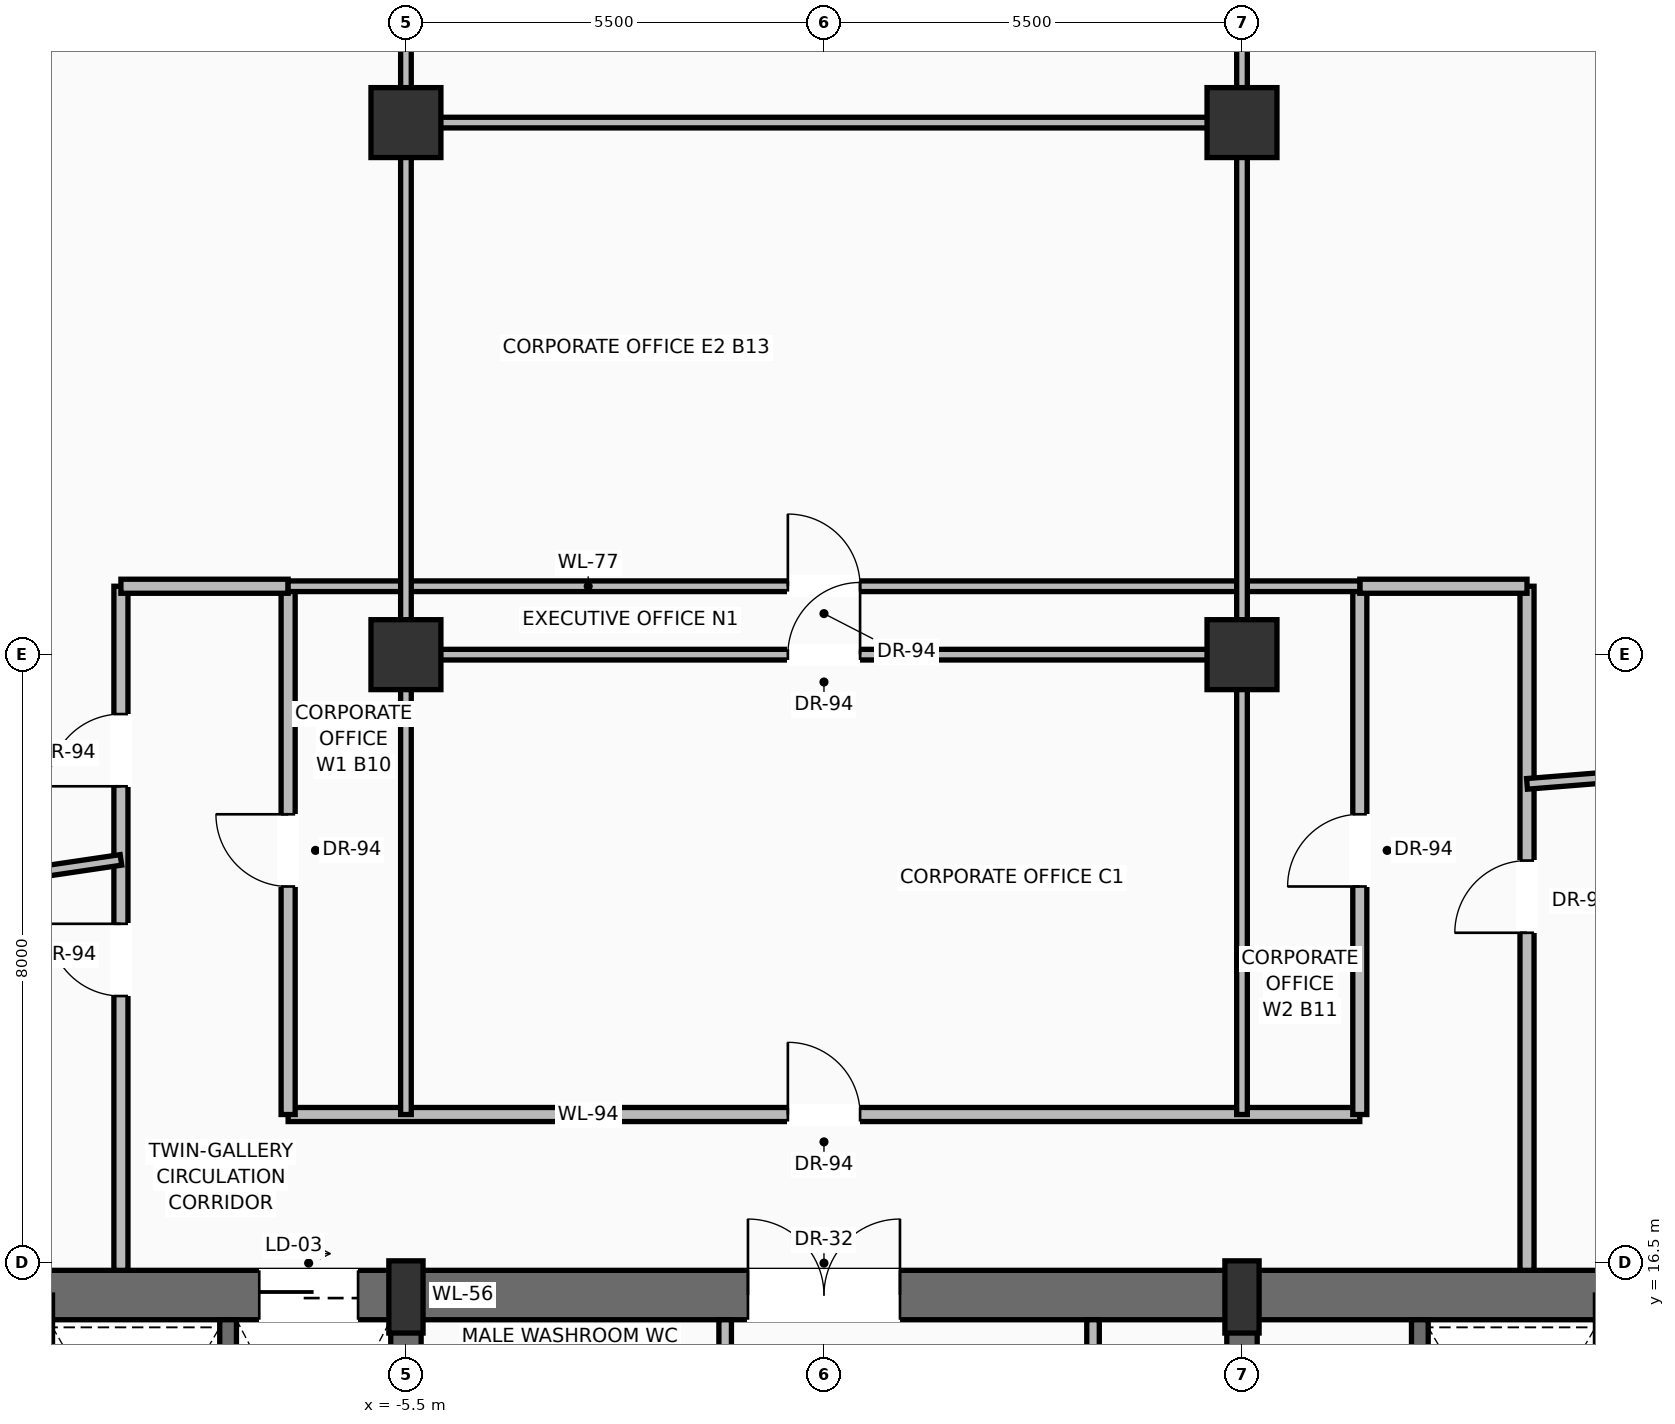
"""IFC4 building model, lengths in metres.
Left out: names, types, materials, properties, quantities, classifications, styles, units other than length and angle.
Written with IfcOpenShell. Run it as: python <this file> out.ifc"""

import sys

from ifc_helpers import new_model, si_unit, direction, frame, frame_2d, origin, origin_2d, place, context, subcontext, project, spatial, rectangle, extrude, source, transform, mapped, element, fill, save


model = new_model("IFC4")
c1 = context("Model", 3, precision=1e-05, world=origin(), true_north=direction((0.0, 1.0)))
c2 = subcontext(c1, "Body", "Model", "MODEL_VIEW")
j1 = project(units=[si_unit("LENGTHUNIT", "METRE"), si_unit("PLANEANGLEUNIT", "RADIAN")], contexts=[c1])
p1 = place(None, origin())
s1 = spatial("IfcSite", under=j1, at=p1, CompositionType="ELEMENT")
p2 = place(p1, origin())
s2 = spatial("IfcBuilding", under=s1, at=p2, CompositionType="ELEMENT")
p3 = place(p2, frame((0.0, 0.0, 125.6)))
s3 = spatial("IfcBuildingStorey", under=s2, at=p3, CompositionType="ELEMENT", Elevation=125.6)
p4 = place(p3, frame((-10.8, 16.075, 0.0), z_axis=(0.0, 0.0, 1.0), x_axis=(1.0, 0.0, 0.0)))
e1 = element("IfcWall", 1, at=p4, inside=s3, PredefinedType="SHEAR", context=c2, shape_type="SweptSolid", body=[
    extrude(rectangle(XDim=21.6, YDim=0.65, at=frame_2d((10.8, 0.0))), origin(), (0.0, 0.0, 1.0), 3.47),
])
p5 = place(p4, frame((3.37, 0.0, 0.0)))
e2 = element("IfcOpeningElement", 2, at=p5, cuts=e1, PredefinedType="OPENING", context=c2, shape_type="SweptSolid", body=[
    extrude(rectangle(XDim=1.3, YDim=2.3, at=frame_2d((0.65, 1.15))), frame((0.0, 0.335, 0.0), z_axis=(0.0, -1.0, 0.0), x_axis=(1.0, 0.0, 0.0)), (0.0, 0.0, 1.0), 0.67),
])
p6 = place(p4, frame((9.8, 0.0, 0.0)))
e3 = element("IfcOpeningElement", 3, at=p6, cuts=e1, PredefinedType="OPENING", context=c2, shape_type="SweptSolid", body=[
    extrude(rectangle(XDim=2.0, YDim=2.4, at=frame_2d((1.0, 1.2))), frame((0.0, 0.335, 0.0), z_axis=(0.0, -1.0, 0.0), x_axis=(1.0, 0.0, 0.0)), (0.0, 0.0, 1.0), 0.67),
])
for number, where, z_axis, x_axis in (
    (4, (-10.475, 0.525, 0.0), (0.0, 0.0, 1.0), (0.0, 1.0, 0.0)),
    (5, (10.475, 0.525, 0.0), (0.0, 0.0, 1.0), (0.0, 1.0, 0.0)),
):
    element("IfcWall", number, at=place(p3, frame(where, z_axis=z_axis, x_axis=x_axis)), inside=s3, PredefinedType="SHEAR", context=c2, shape_type="SweptSolid", body=[
        extrude(rectangle(XDim=15.55, YDim=0.65, at=frame_2d((7.775, 0.0))), origin(), (0.0, 0.0, 1.0), 3.47),
    ])
p7 = place(p3, frame((-5.5, 0.525, 0.0), z_axis=(0.0, 0.0, 1.0), x_axis=(0.0, 1.0, 0.0)))
e6 = element("IfcWall", 6, at=p7, inside=s3, PredefinedType="SHEAR", context=c2, shape_type="SweptSolid", body=[
    extrude(rectangle(XDim=15.55, YDim=0.4, at=frame_2d((7.775, 0.0))), origin(), (0.0, 0.0, 1.0), 3.47),
])
p8 = place(p7, frame((8.975, 0.0, 0.0)))
e7 = element("IfcOpeningElement", 7, at=p8, cuts=e6, PredefinedType="OPENING", context=c2, shape_type="SweptSolid", body=[
    extrude(rectangle(XDim=1.1, YDim=2.2, at=frame_2d((0.55, 1.1))), frame((0.0, 0.21, 0.0), z_axis=(0.0, -1.0, 0.0), x_axis=(1.0, 0.0, 0.0)), (0.0, 0.0, 1.0), 0.42),
])
p9 = place(p3, frame((5.5, 0.525, 0.0), z_axis=(0.0, 0.0, 1.0), x_axis=(0.0, 1.0, 0.0)))
e8 = element("IfcWall", 8, at=p9, inside=s3, PredefinedType="SHEAR", context=c2, shape_type="SweptSolid", body=[
    extrude(rectangle(XDim=15.55, YDim=0.4, at=frame_2d((7.775, 0.0))), origin(), (0.0, 0.0, 1.0), 3.47),
])
p10 = place(p9, frame((8.975, 0.0, 0.0)))
e9 = element("IfcOpeningElement", 9, at=p10, cuts=e8, PredefinedType="OPENING", context=c2, shape_type="SweptSolid", body=[
    extrude(rectangle(XDim=1.1, YDim=2.2, at=frame_2d((0.55, 1.1))), frame((0.0, 0.21, 0.0), z_axis=(0.0, -1.0, 0.0), x_axis=(1.0, 0.0, 0.0)), (0.0, 0.0, 1.0), 0.42),
])
m1 = source(origin(), c2, "Body", "SweptSolid", [
    extrude(rectangle(XDim=0.45, YDim=0.95, at=origin_2d()), origin(), (0.0, 0.0, 1.0), 3.7),
])
for number, where, z_axis, x_axis in (
    (10, (-5.5, 16.05, 0.0), (0.0, 0.0, 1.0), (1.0, 0.0, 0.0)),
    (11, (5.5, 16.05, 0.0), (0.0, 0.0, 1.0), (1.0, 0.0, 0.0)),
):
    element("IfcColumn", number, at=place(p3, frame(where, z_axis=z_axis, x_axis=x_axis)), inside=s3, PredefinedType="PILASTER", context=c2, shape_type="MappedRepresentation", body=[
        mapped(m1, transform((0.0, 0.0, 0.0), scale=1.0)),
    ])
m2 = source(origin(), c2, "Body", "SweptSolid", [
    extrude(rectangle(XDim=0.92, YDim=0.92, at=origin_2d()), origin(), (0.0, 0.0, 1.0), 3.7),
])
for number, where, z_axis, x_axis in (
    (12, (-5.5, 24.5, 0.0), (0.0, 0.0, 1.0), (1.0, 0.0, 0.0)),
    (13, (5.5, 24.5, 0.0), (0.0, 0.0, 1.0), (1.0, 0.0, 0.0)),
    (14, (-5.5, 31.5, 0.0), (0.0, 0.0, 1.0), (1.0, 0.0, 0.0)),
    (15, (5.5, 31.5, 0.0), (0.0, 0.0, 1.0), (1.0, 0.0, 0.0)),
):
    element("IfcColumn", number, at=place(p3, frame(where, z_axis=z_axis, x_axis=x_axis)), inside=s3, PredefinedType="COLUMN", context=c2, shape_type="MappedRepresentation", body=[
        mapped(m2, transform((0.0, 0.0, 0.0), scale=1.0)),
    ])
for number, where, z_axis, x_axis in (
    (16, (-7.84, 11.87, 0.0), (0.0, 0.0, 1.0), (0.0, 1.0, 0.0)),
    (17, (7.84, 11.87, 0.0), (0.0, 0.0, 1.0), (0.0, 1.0, 0.0)),
):
    element("IfcWall", number, at=place(p3, frame(where, z_axis=z_axis, x_axis=x_axis)), inside=s3, PredefinedType="SOLIDWALL", context=c2, shape_type="SweptSolid", body=[
        extrude(rectangle(XDim=3.88, YDim=0.22, at=frame_2d((1.94, 0.0))), origin(), (0.0, 0.0, 1.0), 3.47),
    ])
p11 = place(p3, frame((-1.3, 13.6, 0.0), z_axis=(0.0, 0.0, 1.0), x_axis=(0.0, 1.0, 0.0)))
e18 = element("IfcWall", 18, at=p11, inside=s3, PredefinedType="PARTITIONING", context=c2, shape_type="SweptSolid", body=[
    extrude(rectangle(XDim=2.15, YDim=0.165, at=frame_2d((1.075, 0.0))), origin(), (0.0, 0.0, 1.0), 3.462),
])
p12 = place(p11, frame((0.55, 0.0, 0.0)))
e19 = element("IfcOpeningElement", 19, at=p12, cuts=e18, PredefinedType="OPENING", context=c2, shape_type="SweptSolid", body=[
    extrude(rectangle(XDim=0.9, YDim=2.1, at=frame_2d((0.45, 1.05))), frame((0.0, 0.093, 0.0), z_axis=(0.0, -1.0, 0.0), x_axis=(1.0, 0.0, 0.0)), (0.0, 0.0, 1.0), 0.185),
])
p13 = place(p3, frame((3.54, 11.22, 0.0), z_axis=(0.0, 0.0, 1.0), x_axis=(0.0, 1.0, 0.0)))
e20 = element("IfcWall", 20, at=p13, inside=s3, PredefinedType="PARTITIONING", context=c2, shape_type="SweptSolid", body=[
    extrude(rectangle(XDim=4.53, YDim=0.165, at=frame_2d((2.265, 0.0))), origin(), (0.0, 0.0, 1.0), 3.462),
])
p14 = place(p13, frame((1.25, 0.0, 0.0)))
e21 = element("IfcOpeningElement", 21, at=p14, cuts=e20, PredefinedType="OPENING", context=c2, shape_type="SweptSolid", body=[
    extrude(rectangle(XDim=0.9, YDim=2.1, at=frame_2d((0.45, 1.05))), frame((0.0, 0.093, 0.0), z_axis=(0.0, -1.0, 0.0), x_axis=(1.0, 0.0, 0.0)), (0.0, 0.0, 1.0), 0.185),
])
p15 = place(p3, frame((-7.05, 18.45, 0.0), z_axis=(0.0, 0.0, 1.0), x_axis=(1.0, 0.0, 0.0)))
e22 = element("IfcWall", 22, at=p15, inside=s3, PredefinedType="PARTITIONING", context=c2, shape_type="SweptSolid", body=[
    extrude(rectangle(XDim=14.1, YDim=0.185, at=frame_2d((7.05, 0.0))), origin(), (0.0, 0.0, 1.0), 2.846),
])
p16 = place(p15, frame((6.575, 0.0, 0.0)))
e23 = element("IfcOpeningElement", 23, at=p16, cuts=e22, PredefinedType="OPENING", context=c2, shape_type="SweptSolid", body=[
    extrude(rectangle(XDim=0.95, YDim=2.2, at=frame_2d((0.475, 1.1))), frame((0.0, 0.103, 0.0), z_axis=(0.0, -1.0, 0.0), x_axis=(1.0, 0.0, 0.0)), (0.0, 0.0, 1.0), 0.205),
])
p17 = place(p3, frame((-7.05, 18.45, 0.0), z_axis=(0.0, 0.0, 1.0), x_axis=(0.0, 1.0, 0.0)))
e24 = element("IfcWall", 24, at=p17, inside=s3, PredefinedType="PARTITIONING", context=c2, shape_type="SweptSolid", body=[
    extrude(rectangle(XDim=6.95, YDim=0.185, at=frame_2d((3.475, 0.0))), origin(), (0.0, 0.0, 1.0), 2.846),
])
p18 = place(p17, frame((3.0, 0.0, 0.0)))
e25 = element("IfcOpeningElement", 25, at=p18, cuts=e24, PredefinedType="OPENING", context=c2, shape_type="SweptSolid", body=[
    extrude(rectangle(XDim=0.95, YDim=2.2, at=frame_2d((0.475, 1.1))), frame((0.0, 0.103, 0.0), z_axis=(0.0, -1.0, 0.0), x_axis=(1.0, 0.0, 0.0)), (0.0, 0.0, 1.0), 0.205),
])
p19 = place(p3, frame((7.05, 18.45, 0.0), z_axis=(0.0, 0.0, 1.0), x_axis=(0.0, 1.0, 0.0)))
e26 = element("IfcWall", 26, at=p19, inside=s3, PredefinedType="PARTITIONING", context=c2, shape_type="SweptSolid", body=[
    extrude(rectangle(XDim=6.95, YDim=0.185, at=frame_2d((3.475, 0.0))), origin(), (0.0, 0.0, 1.0), 2.846),
])
p20 = place(p19, frame((3.0, 0.0, 0.0)))
e27 = element("IfcOpeningElement", 27, at=p20, cuts=e26, PredefinedType="OPENING", context=c2, shape_type="SweptSolid", body=[
    extrude(rectangle(XDim=0.95, YDim=2.2, at=frame_2d((0.475, 1.1))), frame((0.0, 0.103, 0.0), z_axis=(0.0, -1.0, 0.0), x_axis=(1.0, 0.0, 0.0)), (0.0, 0.0, 1.0), 0.205),
])
p21 = place(p3, frame((-9.25, 16.4, 0.0), z_axis=(0.0, 0.0, 1.0), x_axis=(0.0, 1.0, 0.0)))
e28 = element("IfcWall", 28, at=p21, inside=s3, PredefinedType="PARTITIONING", context=c2, shape_type="SweptSolid", body=[
    extrude(rectangle(XDim=9.0, YDim=0.185, at=frame_2d((4.5, 0.0))), origin(), (0.0, 0.0, 1.0), 2.846),
])
p22 = place(p21, frame((3.609, 0.0, 0.0)))
e29 = element("IfcOpeningElement", 29, at=p22, cuts=e28, PredefinedType="OPENING", context=c2, shape_type="SweptSolid", body=[
    extrude(rectangle(XDim=0.95, YDim=2.2, at=frame_2d((0.475, 1.1))), frame((0.0, 0.103, 0.0), z_axis=(0.0, -1.0, 0.0), x_axis=(1.0, 0.0, 0.0)), (0.0, 0.0, 1.0), 0.205),
])
p23 = place(p21, frame((6.368, 0.0, 0.0)))
e30 = element("IfcOpeningElement", 30, at=p23, cuts=e28, PredefinedType="OPENING", context=c2, shape_type="SweptSolid", body=[
    extrude(rectangle(XDim=0.95, YDim=2.2, at=frame_2d((0.475, 1.1))), frame((0.0, 0.103, 0.0), z_axis=(0.0, -1.0, 0.0), x_axis=(1.0, 0.0, 0.0)), (0.0, 0.0, 1.0), 0.205),
])
p24 = place(p3, frame((9.25, 16.4, 0.0), z_axis=(0.0, 0.0, 1.0), x_axis=(0.0, 1.0, 0.0)))
e31 = element("IfcWall", 31, at=p24, inside=s3, PredefinedType="PARTITIONING", context=c2, shape_type="SweptSolid", body=[
    extrude(rectangle(XDim=9.0, YDim=0.185, at=frame_2d((4.5, 0.0))), origin(), (0.0, 0.0, 1.0), 2.846),
])
p25 = place(p24, frame((4.441, 0.0, 0.0)))
e32 = element("IfcOpeningElement", 32, at=p25, cuts=e31, PredefinedType="OPENING", context=c2, shape_type="SweptSolid", body=[
    extrude(rectangle(XDim=0.95, YDim=2.2, at=frame_2d((0.475, 1.1))), frame((0.0, 0.103, 0.0), z_axis=(0.0, -1.0, 0.0), x_axis=(1.0, 0.0, 0.0)), (0.0, 0.0, 1.0), 0.205),
])
for number, where, z_axis, x_axis in (
    (33, (-9.25, 25.4, 0.0), (0.0, 0.0, 1.0), (1.0, 0.0, 0.0)),
    (34, (7.05, 25.4, 0.0), (0.0, 0.0, 1.0), (1.0, 0.0, 0.0)),
):
    element("IfcWall", number, at=place(p3, frame(where, z_axis=z_axis, x_axis=x_axis)), inside=s3, PredefinedType="PARTITIONING", context=c2, shape_type="SweptSolid", body=[
        extrude(rectangle(XDim=2.2, YDim=0.185, at=frame_2d((1.1, 0.0))), origin(), (0.0, 0.0, 1.0), 3.462),
    ])
p26 = place(p3, frame((-7.05, 25.4, 0.0), z_axis=(0.0, 0.0, 1.0), x_axis=(1.0, 0.0, 0.0)))
e35 = element("IfcWall", 35, at=p26, inside=s3, PredefinedType="PARTITIONING", context=c2, shape_type="SweptSolid", body=[
    extrude(rectangle(XDim=14.1, YDim=0.14, at=frame_2d((7.05, 0.0))), origin(), (0.0, 0.0, 1.0), 3.462),
])
p27 = place(p26, frame((6.575, 0.0, 0.0)))
e36 = element("IfcOpeningElement", 36, at=p27, cuts=e35, PredefinedType="OPENING", context=c2, shape_type="SweptSolid", body=[
    extrude(rectangle(XDim=0.95, YDim=2.2, at=frame_2d((0.475, 1.1))), frame((0.0, 0.08, 0.0), z_axis=(0.0, -1.0, 0.0), x_axis=(1.0, 0.0, 0.0)), (0.0, 0.0, 1.0), 0.16),
])
for number, where, z_axis, x_axis in (
    (37, (-5.5, 18.45, 0.0), (0.0, 0.0, 1.0), (0.0, 1.0, 0.0)),
    (38, (5.5, 18.45, 0.0), (0.0, 0.0, 1.0), (0.0, 1.0, 0.0)),
):
    element("IfcWall", number, at=place(p3, frame(where, z_axis=z_axis, x_axis=x_axis)), inside=s3, PredefinedType="PARTITIONING", context=c2, shape_type="SweptSolid", body=[
        extrude(rectangle(XDim=14.05, YDim=0.14, at=frame_2d((7.025, 0.0))), origin(), (0.0, 0.0, 1.0), 2.846),
    ])
p28 = place(p3, frame((-5.5, 24.5, 0.0), z_axis=(0.0, 0.0, 1.0), x_axis=(1.0, 0.0, 0.0)))
e39 = element("IfcWall", 39, at=p28, inside=s3, PredefinedType="PARTITIONING", context=c2, shape_type="SweptSolid", body=[
    extrude(rectangle(XDim=11.0, YDim=0.14, at=frame_2d((5.5, 0.0))), origin(), (0.0, 0.0, 1.0), 2.846),
])
p29 = place(p28, frame((5.025, 0.0, 0.0)))
e40 = element("IfcOpeningElement", 40, at=p29, cuts=e39, PredefinedType="OPENING", context=c2, shape_type="SweptSolid", body=[
    extrude(rectangle(XDim=0.95, YDim=2.2, at=frame_2d((0.475, 1.1))), frame((0.0, 0.08, 0.0), z_axis=(0.0, -1.0, 0.0), x_axis=(1.0, 0.0, 0.0)), (0.0, 0.0, 1.0), 0.16),
])
p30 = place(p3, frame((-5.5, 31.5, 0.0), z_axis=(0.0, 0.0, 1.0), x_axis=(1.0, 0.0, 0.0)))
e41 = element("IfcWall", 41, at=p30, inside=s3, PredefinedType="PARTITIONING", context=c2, shape_type="SweptSolid", body=[
    extrude(rectangle(XDim=11.0, YDim=0.14, at=frame_2d((5.5, 0.0))), origin(), (0.0, 0.0, 1.0), 2.846),
])
p31 = place(p3, frame((-19.487, 20.288, 0.0), z_axis=(0.0, 0.0, 1.0), x_axis=(0.989271254503, 0.146090331693, 0.0)))
e42 = element("IfcWall", 42, at=p31, inside=s3, PredefinedType="PARTITIONING", context=c2, shape_type="SweptSolid", body=[
    extrude(rectangle(XDim=10.348, YDim=0.14, at=frame_2d((5.174, 0.0))), origin(), (0.0, 0.0, 1.0), 3.462),
])
p32 = place(p3, frame((9.25, 22.8, 0.0), z_axis=(0.0, 0.0, 1.0), x_axis=(0.996834873158, 0.079499909791, 0.0)))
e43 = element("IfcWall", 43, at=p32, inside=s3, PredefinedType="PARTITIONING", context=c2, shape_type="SweptSolid", body=[
    extrude(rectangle(XDim=8.623, YDim=0.14, at=frame_2d((4.312, 0.0))), origin(), (0.0, 0.0, 1.0), 3.462),
])
m3 = source(origin(), c2, "Body", "SweptSolid", [
    extrude(rectangle(XDim=1.3, YDim=2.3, at=frame_2d((0.65, 1.15))), frame((0.0, 0.025, 0.0), z_axis=(0.0, -1.0, 0.0), x_axis=(1.0, 0.0, 0.0)), (0.0, 0.0, 1.0), 0.05),
])
p33 = place(p5, origin())
e44 = element("IfcDoor", 44, at=p33, inside=s3, OperationType="SLIDING_TO_RIGHT", PredefinedType="DOOR", context=c2, shape_type="MappedRepresentation", body=[
    mapped(m3, transform((0.0, 0.0, 0.0), scale=1.0)),
])
fill(e2, e44)
m4 = source(origin(), c2, "Body", "SweptSolid", [
    extrude(rectangle(XDim=2.0, YDim=2.4, at=frame_2d((1.0, 1.2))), frame((0.0, 0.025, 0.0), z_axis=(0.0, -1.0, 0.0), x_axis=(1.0, 0.0, 0.0)), (0.0, 0.0, 1.0), 0.05),
])
p34 = place(p6, origin())
e45 = element("IfcDoor", 45, at=p34, inside=s3, OperationType="DOUBLE_DOOR_SINGLE_SWING", PredefinedType="DOOR", context=c2, shape_type="MappedRepresentation", body=[
    mapped(m4, transform((0.0, 0.0, 0.0), scale=1.0)),
])
fill(e3, e45)
m5 = source(origin(), c2, "Body", "SweptSolid", [
    extrude(rectangle(XDim=0.95, YDim=2.2, at=frame_2d((0.475, 1.1))), frame((0.0, 0.025, 0.0), z_axis=(0.0, -1.0, 0.0), x_axis=(1.0, 0.0, 0.0)), (0.0, 0.0, 1.0), 0.05),
])
p35 = place(p16, origin())
e46 = element("IfcDoor", 46, at=p35, inside=s3, OperationType="SINGLE_SWING_LEFT", PredefinedType="DOOR", context=c2, shape_type="MappedRepresentation", body=[
    mapped(m5, transform((0.0, 0.0, 0.0), scale=1.0)),
])
fill(e23, e46)
p36 = place(p22, origin())
e47 = element("IfcDoor", 47, at=p36, inside=s3, OperationType="SINGLE_SWING_RIGHT", PredefinedType="DOOR", context=c2, shape_type="MappedRepresentation", body=[
    mapped(m5, transform((0.0, 0.0, 0.0), scale=1.0)),
])
fill(e29, e47)
p37 = place(p25, origin())
e48 = element("IfcDoor", 48, at=p37, inside=s3, OperationType="SINGLE_SWING_LEFT", PredefinedType="DOOR", context=c2, shape_type="MappedRepresentation", body=[
    mapped(m5, transform((0.0, 0.0, 0.0), scale=1.0)),
])
fill(e32, e48)
p38 = place(p18, origin())
e49 = element("IfcDoor", 49, at=p38, inside=s3, OperationType="SINGLE_SWING_RIGHT", PredefinedType="DOOR", context=c2, shape_type="MappedRepresentation", body=[
    mapped(m5, transform((0.0, 0.0, 0.0), scale=1.0)),
])
fill(e25, e49)
p39 = place(p20, origin())
e50 = element("IfcDoor", 50, at=p39, inside=s3, OperationType="SINGLE_SWING_LEFT", PredefinedType="DOOR", context=c2, shape_type="MappedRepresentation", body=[
    mapped(m5, transform((0.0, 0.0, 0.0), scale=1.0)),
])
fill(e27, e50)
p40 = place(p29, origin())
e51 = element("IfcDoor", 51, at=p40, inside=s3, OperationType="SINGLE_SWING_RIGHT", PredefinedType="DOOR", context=c2, shape_type="MappedRepresentation", body=[
    mapped(m5, transform((0.0, 0.0, 0.0), scale=1.0)),
])
fill(e40, e51)
p41 = place(p23, origin())
e52 = element("IfcDoor", 52, at=p41, inside=s3, OperationType="SINGLE_SWING_LEFT", PredefinedType="DOOR", context=c2, shape_type="MappedRepresentation", body=[
    mapped(m5, transform((0.0, 0.0, 0.0), scale=1.0)),
])
fill(e30, e52)
p42 = place(p27, origin())
e53 = element("IfcDoor", 53, at=p42, inside=s3, OperationType="SINGLE_SWING_LEFT", PredefinedType="DOOR", context=c2, shape_type="MappedRepresentation", body=[
    mapped(m5, transform((0.0, 0.0, 0.0), scale=1.0)),
])
fill(e36, e53)
save(model, sys.argv[1])
